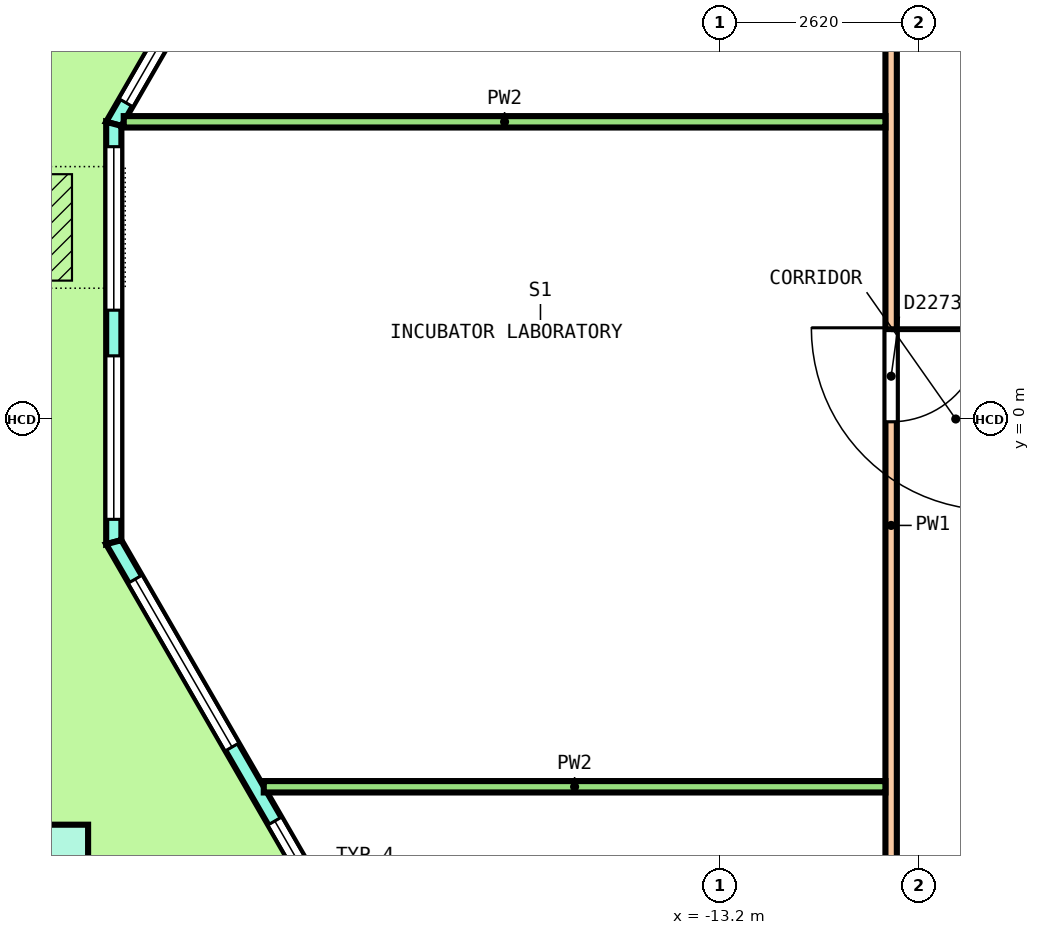
"""IFC4 building model, lengths in metres.
Left out: names, types, materials, properties, quantities, classifications, styles, units other than length and angle.
Written with IfcOpenShell. Run it as: python <this file> out.ifc"""

import sys

from ifc_helpers import new_model, si_unit, direction, frame, frame_2d, origin, origin_2d, place, context, subcontext, project, spatial, polyline, rectangle, outline, extrude, element, fill, save


model = new_model("IFC4")
c1 = context("Model", 3, precision=1e-05, world=origin(), true_north=direction((0.0, 1.0)))
c2 = subcontext(c1, "Body", "Model", "MODEL_VIEW")
j1 = project(units=[si_unit("LENGTHUNIT", "METRE"), si_unit("PLANEANGLEUNIT", "RADIAN")], contexts=[c1])
p1 = place(None, origin())
s1 = spatial("IfcSite", under=j1, at=p1, CompositionType="ELEMENT")
p2 = place(p1, origin())
s2 = spatial("IfcBuilding", under=s1, at=p2, CompositionType="ELEMENT")
p3 = place(p2, frame((0.0, 0.0, 299.0)))
s3 = spatial("IfcBuildingStorey", under=s2, at=p3, CompositionType="ELEMENT", Elevation=299.0)
p4 = place(p3, frame((-21.99, -5.812, 0.0), z_axis=(0.096165528476, -0.166528943905, 0.981335978131), x_axis=(0.490749060083, -0.849815075181, -0.192301060902)))
e1 = element("IfcColumn", 1, at=p4, inside=s3, PredefinedType="COLUMN", context=c2, shape_type="SweptSolid", body=[
    extrude(rectangle(XDim=0.95, YDim=0.95, at=origin_2d()), origin(), (0.0, 0.0, 1.0), 3.709),
])
p5 = place(p3, frame((-13.951, 16.398, 0.0), z_axis=(0.0, 0.0, 1.0), x_axis=(-0.499998359168, -0.866026351117, 0.0)))
e2 = element("IfcWall", 2, at=p5, inside=s3, PredefinedType="SOLIDWALL", context=c2, shape_type="SweptSolid", body=[
    extrude(outline(polyline([(-0.027, -0.1), (1.009, -0.1), (2.045, -0.1), (3.081, -0.1), (4.117, -0.1), (5.154, -0.1), (6.189, -0.1), (7.226, -0.1), (8.262, -0.1), (9.298, -0.1), (10.334, -0.1), (11.37, -0.1), (12.406, -0.1), (13.442, -0.1), (14.478, -0.1), (14.424, 0.1), (13.396, 0.1), (12.367, 0.1), (11.339, 0.1), (10.311, 0.1), (9.282, 0.1), (8.254, 0.1), (7.226, 0.1), (6.197, 0.1), (5.169, 0.1), (4.14, 0.1), (3.112, 0.1), (2.084, 0.1), (1.055, 0.1), (0.027, 0.1), (-0.027, -0.1)])), origin(), (0.0, 0.0, 1.0), 3.7),
])
p6 = place(p5, frame((0.32, 0.0, 0.1)))
e3 = element("IfcOpeningElement", 3, at=p6, cuts=e2, PredefinedType="OPENING", context=c2, shape_type="SweptSolid", body=[
    extrude(rectangle(XDim=2.25, YDim=2.75, at=frame_2d((1.125, 1.375))), frame((0.0, 0.11, 0.0), z_axis=(0.0, -1.0, 0.0), x_axis=(1.0, 0.0, 0.0)), (0.0, 0.0, 1.0), 0.22),
])
p7 = place(p5, frame((3.21, 0.0, 0.1)))
e4 = element("IfcOpeningElement", 4, at=p7, cuts=e2, PredefinedType="OPENING", context=c2, shape_type="SweptSolid", body=[
    extrude(rectangle(XDim=2.25, YDim=2.75, at=frame_2d((1.125, 1.375))), frame((0.0, 0.11, 0.0), z_axis=(0.0, -1.0, 0.0), x_axis=(1.0, 0.0, 0.0)), (0.0, 0.0, 1.0), 0.22),
])
p8 = place(p5, frame((6.326, 0.0, 0.0)))
e5 = element("IfcOpeningElement", 5, at=p8, cuts=e2, PredefinedType="OPENING", context=c2, shape_type="SweptSolid", body=[
    extrude(rectangle(XDim=1.8, YDim=2.4, at=frame_2d((0.9, 1.2))), frame((0.0, 0.11, 0.0), z_axis=(0.0, -1.0, 0.0), x_axis=(1.0, 0.0, 0.0)), (0.0, 0.0, 1.0), 0.22),
])
p9 = place(p5, frame((6.326, 0.0, 2.55)))
e6 = element("IfcOpeningElement", 6, at=p9, cuts=e2, PredefinedType="OPENING", context=c2, shape_type="SweptSolid", body=[
    extrude(rectangle(XDim=1.8, YDim=0.3, at=frame_2d((0.9, 0.15))), frame((0.0, 0.11, 0.0), z_axis=(0.0, -1.0, 0.0), x_axis=(1.0, 0.0, 0.0)), (0.0, 0.0, 1.0), 0.22),
])
p10 = place(p5, frame((8.991, 0.0, 0.1)))
e7 = element("IfcOpeningElement", 7, at=p10, cuts=e2, PredefinedType="OPENING", context=c2, shape_type="SweptSolid", body=[
    extrude(rectangle(XDim=2.25, YDim=2.75, at=frame_2d((1.125, 1.375))), frame((0.0, 0.11, 0.0), z_axis=(0.0, -1.0, 0.0), x_axis=(1.0, 0.0, 0.0)), (0.0, 0.0, 1.0), 0.22),
])
p11 = place(p5, frame((11.881, 0.0, 0.1)))
e8 = element("IfcOpeningElement", 8, at=p11, cuts=e2, PredefinedType="OPENING", context=c2, shape_type="SweptSolid", body=[
    extrude(rectangle(XDim=2.25, YDim=2.75, at=frame_2d((1.125, 1.375))), frame((0.0, 0.11, 0.0), z_axis=(0.0, -1.0, 0.0), x_axis=(1.0, 0.0, 0.0)), (0.0, 0.0, 1.0), 0.22),
])
p12 = place(p3, frame((-21.177, 3.883, 0.0), z_axis=(0.0, 0.0, 1.0), x_axis=(0.0, -1.0, 0.0)))
e9 = element("IfcWall", 9, at=p12, inside=s3, PredefinedType="SOLIDWALL", context=c2, shape_type="SweptSolid", body=[
    extrude(outline(polyline([(-0.027, -0.1), (1.084, -0.1), (2.196, -0.1), (3.307, -0.1), (4.419, -0.1), (5.53, -0.1), (5.477, 0.1), (4.387, 0.1), (3.297, 0.1), (2.207, 0.1), (1.117, 0.1), (0.027, 0.1), (-0.027, -0.1)])), origin(), (0.0, 0.0, 1.0), 3.7),
])
p13 = place(p12, frame((0.301, 0.0, 0.1)))
e10 = element("IfcOpeningElement", 10, at=p13, cuts=e9, PredefinedType="OPENING", context=c2, shape_type="SweptSolid", body=[
    extrude(rectangle(XDim=2.15, YDim=2.75, at=frame_2d((1.075, 1.375))), frame((0.0, 0.11, 0.0), z_axis=(0.0, -1.0, 0.0), x_axis=(1.0, 0.0, 0.0)), (0.0, 0.0, 1.0), 0.22),
])
p14 = place(p12, frame((3.052, 0.0, 0.1)))
e11 = element("IfcOpeningElement", 11, at=p14, cuts=e9, PredefinedType="OPENING", context=c2, shape_type="SweptSolid", body=[
    extrude(rectangle(XDim=2.15, YDim=2.75, at=frame_2d((1.075, 1.375))), frame((0.0, 0.11, 0.0), z_axis=(0.0, -1.0, 0.0), x_axis=(1.0, 0.0, 0.0)), (0.0, 0.0, 1.0), 0.22),
])
p15 = place(p3, frame((-21.177, -1.62, 0.0), z_axis=(0.0, 0.0, 1.0), x_axis=(0.50000545275, -0.866022255615, 0.0)))
e12 = element("IfcWall", 12, at=p15, inside=s3, PredefinedType="SOLIDWALL", context=c2, shape_type="SweptSolid", body=[
    extrude(outline(polyline([(-0.027, -0.1), (0.997, -0.1), (2.02, -0.1), (3.044, -0.1), (4.067, -0.1), (5.091, -0.1), (6.115, -0.1), (7.138, -0.1), (8.162, -0.1), (9.185, -0.1), (10.209, -0.1), (11.232, -0.1), (12.256, -0.1), (13.279, -0.1), (14.303, -0.1), (15.327, -0.1), (16.35, -0.1), (17.374, -0.1), (18.397, -0.1), (18.344, 0.1), (17.326, 0.1), (16.308, 0.1), (15.291, 0.1), (14.273, 0.1), (13.256, 0.1), (12.238, 0.1), (11.22, 0.1), (10.203, 0.1), (9.185, 0.1), (8.167, 0.1), (7.15, 0.1), (6.132, 0.1), (5.115, 0.1), (4.097, 0.1), (3.08, 0.1), (2.062, 0.1), (1.044, 0.1), (0.027, 0.1), (-0.027, -0.1)])), origin(), (0.0, 0.0, 1.0), 3.7),
])
p16 = place(p15, frame((0.562, 0.0, 0.1)))
e13 = element("IfcOpeningElement", 13, at=p16, cuts=e12, PredefinedType="OPENING", context=c2, shape_type="SweptSolid", body=[
    extrude(rectangle(XDim=2.55, YDim=2.75, at=frame_2d((1.275, 1.375))), frame((0.0, 0.11, 0.0), z_axis=(0.0, -1.0, 0.0), x_axis=(1.0, 0.0, 0.0)), (0.0, 0.0, 1.0), 0.22),
])
p17 = place(p15, frame((4.236, 0.0, 0.1)))
e14 = element("IfcOpeningElement", 14, at=p17, cuts=e12, PredefinedType="OPENING", context=c2, shape_type="SweptSolid", body=[
    extrude(rectangle(XDim=2.55, YDim=2.75, at=frame_2d((1.275, 1.375))), frame((0.0, 0.11, 0.0), z_axis=(0.0, -1.0, 0.0), x_axis=(1.0, 0.0, 0.0)), (0.0, 0.0, 1.0), 0.22),
])
p18 = place(p15, frame((8.285, 0.0, 0.0)))
e15 = element("IfcOpeningElement", 15, at=p18, cuts=e12, PredefinedType="OPENING", context=c2, shape_type="SweptSolid", body=[
    extrude(rectangle(XDim=1.8, YDim=2.4, at=frame_2d((0.9, 1.2))), frame((0.0, 0.11, 0.0), z_axis=(0.0, -1.0, 0.0), x_axis=(1.0, 0.0, 0.0)), (0.0, 0.0, 1.0), 0.22),
])
p19 = place(p15, frame((8.285, 0.0, 2.55)))
e16 = element("IfcOpeningElement", 16, at=p19, cuts=e12, PredefinedType="OPENING", context=c2, shape_type="SweptSolid", body=[
    extrude(rectangle(XDim=1.8, YDim=0.3, at=frame_2d((0.9, 0.15))), frame((0.0, 0.11, 0.0), z_axis=(0.0, -1.0, 0.0), x_axis=(1.0, 0.0, 0.0)), (0.0, 0.0, 1.0), 0.22),
])
p20 = place(p15, frame((11.584, 0.0, 0.1)))
e17 = element("IfcOpeningElement", 17, at=p20, cuts=e12, PredefinedType="OPENING", context=c2, shape_type="SweptSolid", body=[
    extrude(rectangle(XDim=2.55, YDim=2.75, at=frame_2d((1.275, 1.375))), frame((0.0, 0.11, 0.0), z_axis=(0.0, -1.0, 0.0), x_axis=(1.0, 0.0, 0.0)), (0.0, 0.0, 1.0), 0.22),
])
p21 = place(p15, frame((15.258, 0.0, 0.1)))
e18 = element("IfcOpeningElement", 18, at=p21, cuts=e12, PredefinedType="OPENING", context=c2, shape_type="SweptSolid", body=[
    extrude(rectangle(XDim=2.55, YDim=2.75, at=frame_2d((1.275, 1.375))), frame((0.0, 0.11, 0.0), z_axis=(0.0, -1.0, 0.0), x_axis=(1.0, 0.0, 0.0)), (0.0, 0.0, 1.0), 0.22),
])
p22 = place(p3, frame((-10.95, -9.975, 0.0), z_axis=(0.0, 0.0, 1.0), x_axis=(0.0, 1.0, 0.0)))
e19 = element("IfcWall", 19, at=p22, inside=s3, PredefinedType="PARTITIONING", context=c2, shape_type="SweptSolid", body=[
    extrude(rectangle(XDim=17.15, YDim=0.15, at=frame_2d((8.575, 0.0))), origin(), (0.0, 0.0, 1.0), 2.9),
])
p23 = place(p22, frame((9.938, 0.0, 0.0)))
e20 = element("IfcOpeningElement", 20, at=p23, cuts=e19, PredefinedType="OPENING", context=c2, shape_type="SweptSolid", body=[
    extrude(rectangle(XDim=1.2, YDim=2.1, at=frame_2d((0.6, 1.05))), frame((0.0, 0.085, 0.0), z_axis=(0.0, -1.0, 0.0), x_axis=(1.0, 0.0, 0.0)), (0.0, 0.0, 1.0), 0.17),
])
p24 = place(p22, frame((2.427, 0.0, 0.0)))
e21 = element("IfcOpeningElement", 21, at=p24, cuts=e19, PredefinedType="OPENING", context=c2, shape_type="SweptSolid", body=[
    extrude(rectangle(XDim=1.2, YDim=2.1, at=frame_2d((0.6, 1.05))), frame((0.0, 0.085, 0.0), z_axis=(0.0, -1.0, 0.0), x_axis=(1.0, 0.0, 0.0)), (0.0, 0.0, 1.0), 0.17),
])
p25 = place(p3, frame((-21.046, 3.91, 0.0), z_axis=(0.0, 0.0, 1.0), x_axis=(1.0, 0.0, 0.0)))
e22 = element("IfcWall", 22, at=p25, inside=s3, PredefinedType="PARTITIONING", context=c2, shape_type="SweptSolid", body=[
    extrude(rectangle(XDim=10.021, YDim=0.15, at=frame_2d((5.011, 0.0))), origin(), (0.0, 0.0, 1.0), 2.9),
])
p26 = place(p3, frame((-19.204, -4.838, 0.0), z_axis=(0.0, 0.0, 1.0), x_axis=(1.0, 0.0, 0.0)))
e23 = element("IfcWall", 23, at=p26, inside=s3, PredefinedType="PARTITIONING", context=c2, shape_type="SweptSolid", body=[
    extrude(rectangle(XDim=8.179, YDim=0.15, at=frame_2d((4.089, 0.0))), origin(), (0.0, 0.0, 1.0), 2.9),
])
p27 = place(p11, origin())
e24 = element("IfcWindow", 24, at=p27, inside=s3, PartitioningType="SINGLE_PANEL", PredefinedType="WINDOW", context=c2, shape_type="SweptSolid", body=[
    extrude(rectangle(XDim=2.25, YDim=2.75, at=frame_2d((1.125, 1.375))), frame((0.0, 0.03, 0.0), z_axis=(0.0, -1.0, 0.0), x_axis=(1.0, 0.0, 0.0)), (0.0, 0.0, 1.0), 0.06),
])
fill(e8, e24)
p28 = place(p13, origin())
e25 = element("IfcWindow", 25, at=p28, inside=s3, PartitioningType="SINGLE_PANEL", PredefinedType="WINDOW", context=c2, shape_type="SweptSolid", body=[
    extrude(rectangle(XDim=2.15, YDim=2.75, at=frame_2d((1.075, 1.375))), frame((0.0, 0.03, 0.0), z_axis=(0.0, -1.0, 0.0), x_axis=(1.0, 0.0, 0.0)), (0.0, 0.0, 1.0), 0.06),
])
fill(e10, e25)
p29 = place(p14, origin())
e26 = element("IfcWindow", 26, at=p29, inside=s3, PartitioningType="SINGLE_PANEL", PredefinedType="WINDOW", context=c2, shape_type="SweptSolid", body=[
    extrude(rectangle(XDim=2.15, YDim=2.75, at=frame_2d((1.075, 1.375))), frame((0.0, 0.03, 0.0), z_axis=(0.0, -1.0, 0.0), x_axis=(1.0, 0.0, 0.0)), (0.0, 0.0, 1.0), 0.06),
])
fill(e11, e26)
p30 = place(p16, origin())
e27 = element("IfcWindow", 27, at=p30, inside=s3, PartitioningType="SINGLE_PANEL", PredefinedType="WINDOW", context=c2, shape_type="SweptSolid", body=[
    extrude(rectangle(XDim=2.55, YDim=2.75, at=frame_2d((1.275, 1.375))), frame((0.0, 0.03, 0.0), z_axis=(0.0, -1.0, 0.0), x_axis=(1.0, 0.0, 0.0)), (0.0, 0.0, 1.0), 0.06),
])
fill(e13, e27)
p31 = place(p17, origin())
e28 = element("IfcWindow", 28, at=p31, inside=s3, PartitioningType="SINGLE_PANEL", PredefinedType="WINDOW", context=c2, shape_type="SweptSolid", body=[
    extrude(rectangle(XDim=2.55, YDim=2.75, at=frame_2d((1.275, 1.375))), frame((0.0, 0.03, 0.0), z_axis=(0.0, -1.0, 0.0), x_axis=(1.0, 0.0, 0.0)), (0.0, 0.0, 1.0), 0.06),
])
fill(e14, e28)
p32 = place(p23, origin())
e29 = element("IfcDoor", 29, at=p32, inside=s3, OperationType="DOUBLE_DOOR_SINGLE_SWING", PredefinedType="DOOR", context=c2, shape_type="SweptSolid", body=[
    extrude(rectangle(XDim=1.2, YDim=2.1, at=frame_2d((0.6, 1.05))), frame((0.0, 0.025, 0.0), z_axis=(0.0, -1.0, 0.0), x_axis=(1.0, 0.0, 0.0)), (0.0, 0.0, 1.0), 0.05),
])
fill(e20, e29)
save(model, sys.argv[1])
